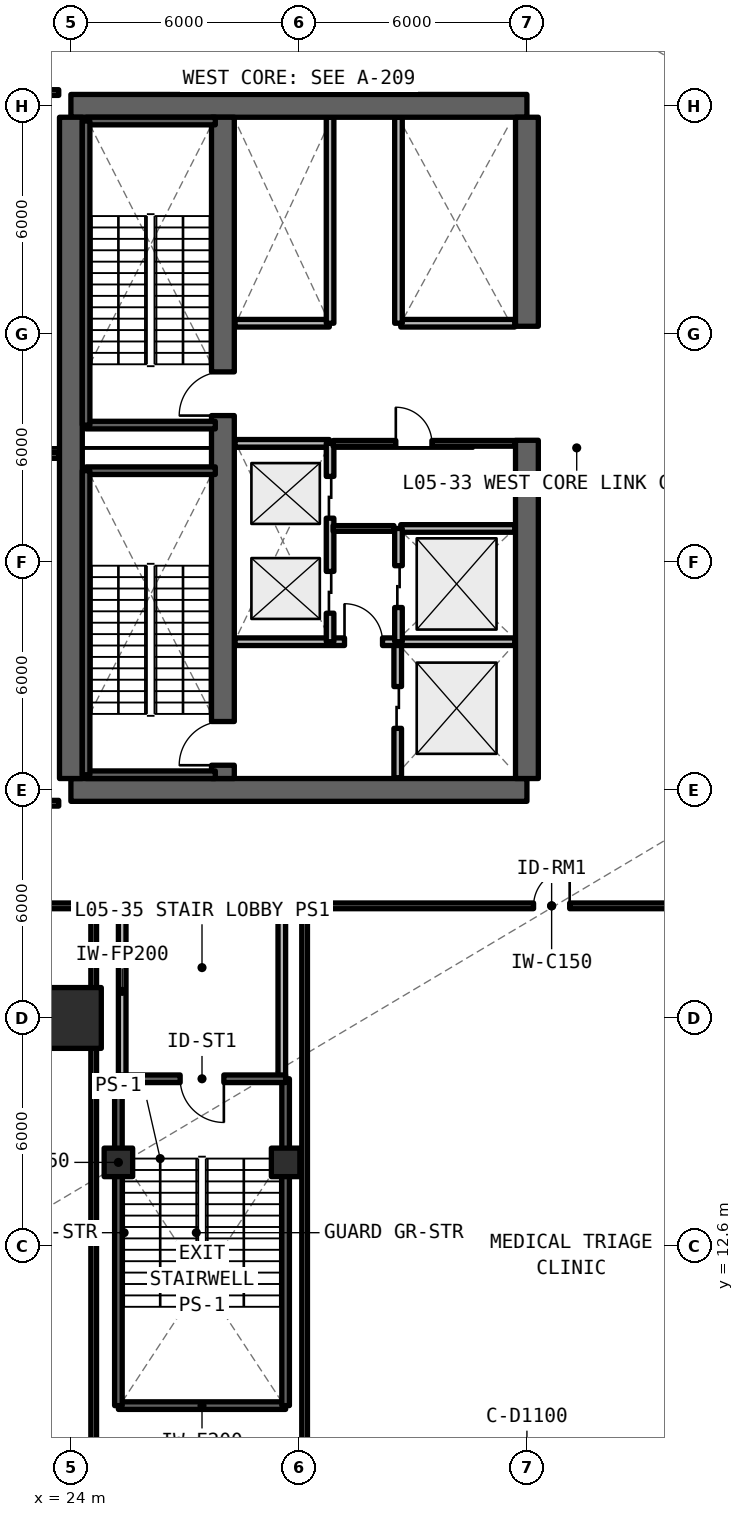
"""IFC4 building model, lengths in metres.
Left out: names, types, materials, properties, quantities, classifications, styles, units other than length and angle.
Written with IfcOpenShell. Run it as: python <this file> out.ifc"""

import sys

from ifc_helpers import new_model, si_unit, direction, frame, frame_2d, origin, origin_2d, place, context, subcontext, project, spatial, rectangle, extrude, element, fill, save


model = new_model("IFC4")
c1 = context("Model", 3, precision=1e-05, world=origin(), true_north=direction((0.0, 1.0)))
c2 = subcontext(c1, "Body", "Model", "MODEL_VIEW")
j1 = project(units=[si_unit("LENGTHUNIT", "METRE"), si_unit("PLANEANGLEUNIT", "RADIAN")], contexts=[c1])
p1 = place(None, origin())
s1 = spatial("IfcSite", under=j1, at=p1, CompositionType="ELEMENT")
p2 = place(p1, origin())
s2 = spatial("IfcBuilding", under=s1, at=p2, CompositionType="ELEMENT")
p3 = place(p2, frame((0.0, 0.0, 19.47)))
s3 = spatial("IfcBuildingStorey", under=s2, at=p3, CompositionType="ELEMENT", Elevation=19.47)
for number, where, z_axis, x_axis in (
    (1, (24.0, 24.6, 0.0), (0.0, 0.0, 1.0), (1.0, 0.0, 0.0)),
    (2, (36.0, 42.6, 0.0), (0.0, 0.0, 1.0), (-1.0, 0.0, 0.0)),
):
    element("IfcWall", number, at=place(p3, frame(where, z_axis=z_axis, x_axis=x_axis)), inside=s3, PredefinedType="SHEAR", context=c2, shape_type="SweptSolid", body=[
        extrude(rectangle(XDim=12.0, YDim=0.6, at=frame_2d((6.0, 0.0))), origin(), (0.0, 0.0, 1.0), 4.62),
    ])
p4 = place(p3, frame((24.0, 24.9, 0.0), z_axis=(0.0, 0.0, 1.0), x_axis=(0.0, 1.0, 0.0)))
e3 = element("IfcWall", 3, at=p4, inside=s3, PredefinedType="SHEAR", context=c2, shape_type="SweptSolid", body=[
    extrude(rectangle(XDim=17.4, YDim=0.6, at=frame_2d((8.7, 0.0))), origin(), (0.0, 0.0, 1.0), 4.62),
])
p5 = place(p3, frame((36.0, 24.9, 0.0), z_axis=(0.0, 0.0, 1.0), x_axis=(0.0, 1.0, 0.0)))
e4 = element("IfcWall", 4, at=p5, inside=s3, PredefinedType="SHEAR", context=c2, shape_type="SweptSolid", body=[
    extrude(rectangle(XDim=8.9, YDim=0.6, at=frame_2d((4.45, 0.0))), origin(), (0.0, 0.0, 1.0), 4.62),
])
p6 = place(p3, frame((36.0, 36.8, 0.0), z_axis=(0.0, 0.0, 1.0), x_axis=(0.0, 1.0, 0.0)))
e5 = element("IfcWall", 5, at=p6, inside=s3, PredefinedType="SHEAR", context=c2, shape_type="SweptSolid", body=[
    extrude(rectangle(XDim=5.5, YDim=0.6, at=frame_2d((2.75, 0.0))), origin(), (0.0, 0.0, 1.0), 4.62),
])
p7 = place(p3, frame((28.0, 24.9, 0.0), z_axis=(0.0, 0.0, 1.0), x_axis=(0.0, 1.0, 0.0)))
e6 = element("IfcWall", 6, at=p7, inside=s3, PredefinedType="SHEAR", context=c2, shape_type="SweptSolid", body=[
    extrude(rectangle(XDim=17.4, YDim=0.6, at=frame_2d((8.7, 0.0))), origin(), (0.0, 0.0, 1.0), 4.62),
])
p8 = place(p7, frame((0.35, 0.0, 0.0)))
e7 = element("IfcOpeningElement", 7, at=p8, cuts=e6, PredefinedType="OPENING", context=c2, shape_type="SweptSolid", body=[
    extrude(rectangle(XDim=1.15, YDim=2.15, at=frame_2d((0.575, 1.075))), frame((0.0, 0.31, 0.0), z_axis=(0.0, -1.0, 0.0), x_axis=(1.0, 0.0, 0.0)), (0.0, 0.0, 1.0), 0.62),
])
p9 = place(p7, frame((9.55, 0.0, 0.0)))
e8 = element("IfcOpeningElement", 8, at=p9, cuts=e6, PredefinedType="OPENING", context=c2, shape_type="SweptSolid", body=[
    extrude(rectangle(XDim=1.15, YDim=2.15, at=frame_2d((0.575, 1.075))), frame((0.0, 0.31, 0.0), z_axis=(0.0, -1.0, 0.0), x_axis=(1.0, 0.0, 0.0)), (0.0, 0.0, 1.0), 0.62),
])
p10 = place(p3, frame((24.0, 18.6, 0.0), z_axis=(0.0, 0.0, 1.0), x_axis=(1.0, 0.0, 0.0)))
e9 = element("IfcColumn", 9, at=p10, inside=s3, PredefinedType="COLUMN", context=c2, shape_type="SweptSolid", body=[
    extrude(rectangle(XDim=1.6, YDim=1.6, at=origin_2d()), origin(), (0.0, 0.0, 1.0), 4.62),
])
for number, where, z_axis, x_axis in (
    (10, (25.25, 14.8, 0.0), (0.0, 0.0, 1.0), (1.0, 0.0, 0.0)),
    (11, (29.65, 14.8, 0.0), (0.0, 0.0, 1.0), (1.0, 0.0, 0.0)),
):
    element("IfcColumn", number, at=place(p3, frame(where, z_axis=z_axis, x_axis=x_axis)), inside=s3, PredefinedType="COLUMN", context=c2, shape_type="SweptSolid", body=[
        extrude(rectangle(XDim=0.75, YDim=0.75, at=origin_2d()), origin(), (0.0, 0.0, 1.0), 4.27),
    ])
p11 = place(p3, frame((32.6, 24.92, 0.0), z_axis=(0.0, 0.0, 1.0), x_axis=(0.0, 1.0, 0.0)))
e12 = element("IfcWall", 12, at=p11, inside=s3, PredefinedType="SOLIDWALL", context=c2, shape_type="SweptSolid", body=[
    extrude(rectangle(XDim=3.58, YDim=0.2, at=frame_2d((1.79, 0.0))), origin(), (0.0, 0.0, 1.0), 3.49),
])
p12 = place(p11, frame((1.3, 0.0, 0.0)))
e13 = element("IfcOpeningElement", 13, at=p12, cuts=e12, PredefinedType="OPENING", context=c2, shape_type="SweptSolid", body=[
    extrude(rectangle(XDim=1.1, YDim=2.2, at=frame_2d((0.55, 1.1))), frame((0.0, 0.11, 0.0), z_axis=(0.0, -1.0, 0.0), x_axis=(1.0, 0.0, 0.0)), (0.0, 0.0, 1.0), 0.22),
])
p13 = place(p3, frame((28.32, 28.5, 0.0), z_axis=(0.0, 0.0, 1.0), x_axis=(1.0, 0.0, 0.0)))
e14 = element("IfcWall", 14, at=p13, inside=s3, PredefinedType="SOLIDWALL", context=c2, shape_type="SweptSolid", body=[
    extrude(rectangle(XDim=7.36, YDim=0.2, at=frame_2d((3.68, 0.0))), origin(), (0.0, 0.0, 1.0), 3.49),
])
p14 = place(p13, frame((2.88, 0.0, 0.0)))
e15 = element("IfcOpeningElement", 15, at=p14, cuts=e14, PredefinedType="OPENING", context=c2, shape_type="SweptSolid", body=[
    extrude(rectangle(XDim=1.0, YDim=2.15, at=frame_2d((0.5, 1.075))), frame((0.0, 0.11, 0.0), z_axis=(0.0, -1.0, 0.0), x_axis=(1.0, 0.0, 0.0)), (0.0, 0.0, 1.0), 0.22),
])
p15 = place(p3, frame((28.32, 33.72, 0.0), z_axis=(0.0, 0.0, 1.0), x_axis=(1.0, 0.0, 0.0)))
e16 = element("IfcWall", 16, at=p15, inside=s3, PredefinedType="SOLIDWALL", context=c2, shape_type="SweptSolid", body=[
    extrude(rectangle(XDim=2.48, YDim=0.2, at=frame_2d((1.24, 0.0))), origin(), (0.0, 0.0, 1.0), 3.49),
])
p16 = place(p3, frame((30.82, 28.5, 0.0), z_axis=(0.0, 0.0, 1.0), x_axis=(0.0, 1.0, 0.0)))
e17 = element("IfcWall", 17, at=p16, inside=s3, PredefinedType="SOLIDWALL", context=c2, shape_type="SweptSolid", body=[
    extrude(rectangle(XDim=5.22, YDim=0.2, at=frame_2d((2.61, 0.0))), origin(), (0.0, 0.0, 1.0), 3.49),
])
p17 = place(p16, frame((0.75, 0.0, 0.0)))
e18 = element("IfcOpeningElement", 18, at=p17, cuts=e17, PredefinedType="OPENING", context=c2, shape_type="SweptSolid", body=[
    extrude(rectangle(XDim=1.1, YDim=2.2, at=frame_2d((0.55, 1.1))), frame((0.0, 0.11, 0.0), z_axis=(0.0, -1.0, 0.0), x_axis=(1.0, 0.0, 0.0)), (0.0, 0.0, 1.0), 0.22),
])
p18 = place(p16, frame((3.25, 0.0, 0.0)))
e19 = element("IfcOpeningElement", 19, at=p18, cuts=e17, PredefinedType="OPENING", context=c2, shape_type="SweptSolid", body=[
    extrude(rectangle(XDim=1.1, YDim=2.2, at=frame_2d((0.55, 1.1))), frame((0.0, 0.11, 0.0), z_axis=(0.0, -1.0, 0.0), x_axis=(1.0, 0.0, 0.0)), (0.0, 0.0, 1.0), 0.22),
])
p19 = place(p3, frame((32.68, 31.48, 0.0), z_axis=(0.0, 0.0, 1.0), x_axis=(1.0, 0.0, 0.0)))
e20 = element("IfcWall", 20, at=p19, inside=s3, PredefinedType="SOLIDWALL", context=c2, shape_type="SweptSolid", body=[
    extrude(rectangle(XDim=3.0, YDim=0.2, at=frame_2d((1.5, 0.0))), origin(), (0.0, 0.0, 1.0), 3.49),
])
p20 = place(p3, frame((32.62, 28.5, 0.0), z_axis=(0.0, 0.0, 1.0), x_axis=(0.0, 1.0, 0.0)))
e21 = element("IfcWall", 21, at=p20, inside=s3, PredefinedType="SOLIDWALL", context=c2, shape_type="SweptSolid", body=[
    extrude(rectangle(XDim=2.98, YDim=0.2, at=frame_2d((1.49, 0.0))), origin(), (0.0, 0.0, 1.0), 3.49),
])
p21 = place(p20, frame((0.9, 0.0, 0.0)))
e22 = element("IfcOpeningElement", 22, at=p21, cuts=e21, PredefinedType="OPENING", context=c2, shape_type="SweptSolid", body=[
    extrude(rectangle(XDim=1.1, YDim=2.2, at=frame_2d((0.55, 1.1))), frame((0.0, 0.11, 0.0), z_axis=(0.0, -1.0, 0.0), x_axis=(1.0, 0.0, 0.0)), (0.0, 0.0, 1.0), 0.22),
])
p22 = place(p3, frame((30.9, 31.48, 0.0), z_axis=(0.0, 0.0, 1.0), x_axis=(1.0, 0.0, 0.0)))
e23 = element("IfcWall", 23, at=p22, inside=s3, PredefinedType="SOLIDWALL", context=c2, shape_type="SweptSolid", body=[
    extrude(rectangle(XDim=1.6, YDim=0.15, at=frame_2d((0.8, 0.0))), origin(), (0.0, 0.0, 1.0), 3.49),
])
p23 = place(p3, frame((30.9, 33.72, 0.0), z_axis=(0.0, 0.0, 1.0), x_axis=(1.0, 0.0, 0.0)))
e24 = element("IfcWall", 24, at=p23, inside=s3, PredefinedType="SOLIDWALL", context=c2, shape_type="SweptSolid", body=[
    extrude(rectangle(XDim=4.78, YDim=0.15, at=frame_2d((2.39, 0.0))), origin(), (0.0, 0.0, 1.0), 3.49),
])
p24 = place(p23, frame((1.65, 0.0, 0.0)))
e25 = element("IfcOpeningElement", 25, at=p24, cuts=e24, PredefinedType="OPENING", context=c2, shape_type="SweptSolid", body=[
    extrude(rectangle(XDim=0.95, YDim=2.15, at=frame_2d((0.475, 1.075))), frame((0.0, 0.085, 0.0), z_axis=(0.0, -1.0, 0.0), x_axis=(1.0, 0.0, 0.0)), (0.0, 0.0, 1.0), 0.17),
])
p25 = place(p3, frame((28.32, 36.88, 0.0), z_axis=(0.0, 0.0, 1.0), x_axis=(1.0, 0.0, 0.0)))
e26 = element("IfcWall", 26, at=p25, inside=s3, PredefinedType="SOLIDWALL", context=c2, shape_type="SweptSolid", body=[
    extrude(rectangle(XDim=2.48, YDim=0.2, at=frame_2d((1.24, 0.0))), origin(), (0.0, 0.0, 1.0), 3.49),
])
p26 = place(p3, frame((30.82, 36.88, 0.0), z_axis=(0.0, 0.0, 1.0), x_axis=(0.0, 1.0, 0.0)))
e27 = element("IfcWall", 27, at=p26, inside=s3, PredefinedType="SOLIDWALL", context=c2, shape_type="SweptSolid", body=[
    extrude(rectangle(XDim=5.42, YDim=0.2, at=frame_2d((2.71, 0.0))), origin(), (0.0, 0.0, 1.0), 3.49),
])
p27 = place(p3, frame((32.68, 36.88, 0.0), z_axis=(0.0, 0.0, 1.0), x_axis=(1.0, 0.0, 0.0)))
e28 = element("IfcWall", 28, at=p27, inside=s3, PredefinedType="SOLIDWALL", context=c2, shape_type="SweptSolid", body=[
    extrude(rectangle(XDim=3.0, YDim=0.2, at=frame_2d((1.5, 0.0))), origin(), (0.0, 0.0, 1.0), 3.49),
])
p28 = place(p3, frame((32.62, 36.88, 0.0), z_axis=(0.0, 0.0, 1.0), x_axis=(0.0, 1.0, 0.0)))
e29 = element("IfcWall", 29, at=p28, inside=s3, PredefinedType="SOLIDWALL", context=c2, shape_type="SweptSolid", body=[
    extrude(rectangle(XDim=5.42, YDim=0.2, at=frame_2d((2.71, 0.0))), origin(), (0.0, 0.0, 1.0), 3.49),
])
for number, where, z_axis, x_axis in (
    (30, (25.35, 17.0, 0.0), (0.0, 0.0, 1.0), (0.0, 1.0, 0.0)),
    (31, (29.55, 17.0, 0.0), (0.0, 0.0, 1.0), (0.0, 1.0, 0.0)),
):
    element("IfcWall", number, at=place(p3, frame(where, z_axis=z_axis, x_axis=x_axis)), inside=s3, PredefinedType="SOLIDWALL", context=c2, shape_type="SweptSolid", body=[
        extrude(rectangle(XDim=4.6, YDim=0.2, at=frame_2d((2.3, 0.0))), origin(), (0.0, 0.0, 1.0), 3.49),
    ])
p29 = place(p3, frame((30.15, 21.55, 0.0), z_axis=(0.0, 0.0, 1.0), x_axis=(1.0, 0.0, 0.0)))
e32 = element("IfcWall", 32, at=p29, inside=s3, PredefinedType="SOLIDWALL", context=c2, shape_type="SweptSolid", body=[
    extrude(rectangle(XDim=13.0, YDim=0.15, at=frame_2d((6.5, 0.0))), origin(), (0.0, 0.0, 1.0), 3.49),
])
p30 = place(p29, frame((6.025, 0.0, 0.0)))
e33 = element("IfcOpeningElement", 33, at=p30, cuts=e32, PredefinedType="OPENING", context=c2, shape_type="SweptSolid", body=[
    extrude(rectangle(XDim=0.95, YDim=2.15, at=frame_2d((0.475, 1.075))), frame((0.0, 0.085, 0.0), z_axis=(0.0, -1.0, 0.0), x_axis=(1.0, 0.0, 0.0)), (0.0, 0.0, 1.0), 0.17),
])
p31 = place(p3, frame((30.15, 4.28, 0.0), z_axis=(0.0, 0.0, 1.0), x_axis=(0.0, 1.0, 0.0)))
e34 = element("IfcWall", 34, at=p31, inside=s3, PredefinedType="SOLIDWALL", context=c2, shape_type="SweptSolid", body=[
    extrude(rectangle(XDim=17.27, YDim=0.15, at=frame_2d((8.635, 0.0))), origin(), (0.0, 0.0, 1.0), 3.49),
])
p32 = place(p3, frame((10.2, 24.25, 0.0), z_axis=(0.0, 0.0, 1.0), x_axis=(1.0, 0.0, 0.0)))
e35 = element("IfcWall", 35, at=p32, inside=s3, PredefinedType="SOLIDWALL", context=c2, shape_type="SweptSolid", body=[
    extrude(rectangle(XDim=13.48, YDim=0.15, at=frame_2d((6.74, 0.0))), origin(), (0.0, 0.0, 1.0), 3.49),
])
p33 = place(p32, frame((6.265, 0.0, 0.0)))
e36 = element("IfcOpeningElement", 36, at=p33, cuts=e35, PredefinedType="OPENING", context=c2, shape_type="SweptSolid", body=[
    extrude(rectangle(XDim=0.95, YDim=2.15, at=frame_2d((0.475, 1.075))), frame((0.0, 0.085, 0.0), z_axis=(0.0, -1.0, 0.0), x_axis=(1.0, 0.0, 0.0)), (0.0, 0.0, 1.0), 0.17),
])
p34 = place(p3, frame((10.2, 33.4, 0.0), z_axis=(0.0, 0.0, 1.0), x_axis=(1.0, 0.0, 0.0)))
e37 = element("IfcWall", 37, at=p34, inside=s3, PredefinedType="SOLIDWALL", context=c2, shape_type="SweptSolid", body=[
    extrude(rectangle(XDim=13.48, YDim=0.15, at=frame_2d((6.74, 0.0))), origin(), (0.0, 0.0, 1.0), 3.49),
])
p35 = place(p3, frame((10.2, 42.95, 0.0), z_axis=(0.0, 0.0, 1.0), x_axis=(1.0, 0.0, 0.0)))
e38 = element("IfcWall", 38, at=p35, inside=s3, PredefinedType="SOLIDWALL", context=c2, shape_type="SweptSolid", body=[
    extrude(rectangle(XDim=13.48, YDim=0.15, at=frame_2d((6.74, 0.0))), origin(), (0.0, 0.0, 1.0), 3.49),
])
p36 = place(p35, frame((6.265, 0.0, 0.0)))
e39 = element("IfcOpeningElement", 39, at=p36, cuts=e38, PredefinedType="OPENING", context=c2, shape_type="SweptSolid", body=[
    extrude(rectangle(XDim=0.95, YDim=2.15, at=frame_2d((0.475, 1.075))), frame((0.0, 0.085, 0.0), z_axis=(0.0, -1.0, 0.0), x_axis=(1.0, 0.0, 0.0)), (0.0, 0.0, 1.0), 0.17),
])
p37 = place(p3, frame((10.2, 21.55, 0.0), z_axis=(0.0, 0.0, 1.0), x_axis=(1.0, 0.0, 0.0)))
e40 = element("IfcWall", 40, at=p37, inside=s3, PredefinedType="SOLIDWALL", context=c2, shape_type="SweptSolid", body=[
    extrude(rectangle(XDim=14.4, YDim=0.15, at=frame_2d((7.2, 0.0))), origin(), (0.0, 0.0, 1.0), 3.49),
])
p38 = place(p37, frame((6.65, 0.0, 0.0)))
e41 = element("IfcOpeningElement", 41, at=p38, cuts=e40, PredefinedType="OPENING", context=c2, shape_type="SweptSolid", body=[
    extrude(rectangle(XDim=1.1, YDim=2.15, at=frame_2d((0.55, 1.075))), frame((0.0, 0.085, 0.0), z_axis=(0.0, -1.0, 0.0), x_axis=(1.0, 0.0, 0.0)), (0.0, 0.0, 1.0), 0.17),
])
p39 = place(p3, frame((24.6, 4.28, 0.0), z_axis=(0.0, 0.0, 1.0), x_axis=(0.0, 1.0, 0.0)))
e42 = element("IfcWall", 42, at=p39, inside=s3, PredefinedType="SOLIDWALL", context=c2, shape_type="SweptSolid", body=[
    extrude(rectangle(XDim=17.27, YDim=0.15, at=frame_2d((8.635, 0.0))), origin(), (0.0, 0.0, 1.0), 3.49),
])
for number, where, z_axis, x_axis in (
    (43, (24.4, 25.0, 0.0), (0.0, 0.0, 1.0), (1.0, 0.0, 0.0)),
    (44, (27.8, 33.0, 0.0), (0.0, 0.0, 1.0), (-1.0, 0.0, 0.0)),
):
    element("IfcWall", number, at=place(p3, frame(where, z_axis=z_axis, x_axis=x_axis)), inside=s3, PredefinedType="SOLIDWALL", context=c2, shape_type="SweptSolid", body=[
        extrude(rectangle(XDim=3.4, YDim=0.2, at=frame_2d((1.7, 0.0))), origin(), (0.0, 0.0, 1.0), 4.62),
    ])
p40 = place(p3, frame((24.4, 33.0, 0.0), z_axis=(0.0, 0.0, 1.0), x_axis=(0.0, -1.0, 0.0)))
e45 = element("IfcWall", 45, at=p40, inside=s3, PredefinedType="SOLIDWALL", context=c2, shape_type="SweptSolid", body=[
    extrude(rectangle(XDim=8.0, YDim=0.2, at=frame_2d((4.0, 0.0))), origin(), (0.0, 0.0, 1.0), 4.62),
])
for number, where, z_axis, x_axis in (
    (46, (24.4, 34.2, 0.0), (0.0, 0.0, 1.0), (1.0, 0.0, 0.0)),
    (47, (27.8, 42.2, 0.0), (0.0, 0.0, 1.0), (-1.0, 0.0, 0.0)),
):
    element("IfcWall", number, at=place(p3, frame(where, z_axis=z_axis, x_axis=x_axis)), inside=s3, PredefinedType="SOLIDWALL", context=c2, shape_type="SweptSolid", body=[
        extrude(rectangle(XDim=3.4, YDim=0.2, at=frame_2d((1.7, 0.0))), origin(), (0.0, 0.0, 1.0), 4.62),
    ])
p41 = place(p3, frame((24.4, 42.2, 0.0), z_axis=(0.0, 0.0, 1.0), x_axis=(0.0, -1.0, 0.0)))
e48 = element("IfcWall", 48, at=p41, inside=s3, PredefinedType="SOLIDWALL", context=c2, shape_type="SweptSolid", body=[
    extrude(rectangle(XDim=8.0, YDim=0.2, at=frame_2d((4.0, 0.0))), origin(), (0.0, 0.0, 1.0), 4.62),
])
p42 = place(p3, frame((25.25, 8.4, 0.0), z_axis=(0.0, 0.0, 1.0), x_axis=(1.0, 0.0, 0.0)))
e49 = element("IfcWall", 49, at=p42, inside=s3, PredefinedType="SOLIDWALL", context=c2, shape_type="SweptSolid", body=[
    extrude(rectangle(XDim=4.4, YDim=0.2, at=frame_2d((2.2, 0.0))), origin(), (0.0, 0.0, 1.0), 4.62),
])
p43 = place(p3, frame((29.65, 8.4, 0.0), z_axis=(0.0, 0.0, 1.0), x_axis=(0.0, 1.0, 0.0)))
e50 = element("IfcWall", 50, at=p43, inside=s3, PredefinedType="SOLIDWALL", context=c2, shape_type="SweptSolid", body=[
    extrude(rectangle(XDim=8.6, YDim=0.2, at=frame_2d((4.3, 0.0))), origin(), (0.0, 0.0, 1.0), 4.62),
])
p44 = place(p3, frame((29.65, 17.0, 0.0), z_axis=(0.0, 0.0, 1.0), x_axis=(-1.0, 0.0, 0.0)))
e51 = element("IfcWall", 51, at=p44, inside=s3, PredefinedType="SOLIDWALL", context=c2, shape_type="SweptSolid", body=[
    extrude(rectangle(XDim=4.4, YDim=0.2, at=frame_2d((2.2, 0.0))), origin(), (0.0, 0.0, 1.0), 4.62),
])
p45 = place(p44, frame((1.625, 0.0, 0.0)))
e52 = element("IfcOpeningElement", 52, at=p45, cuts=e51, PredefinedType="OPENING", context=c2, shape_type="SweptSolid", body=[
    extrude(rectangle(XDim=1.15, YDim=2.15, at=frame_2d((0.575, 1.075))), frame((0.0, 0.11, 0.0), z_axis=(0.0, -1.0, 0.0), x_axis=(1.0, 0.0, 0.0)), (0.0, 0.0, 1.0), 0.22),
])
p46 = place(p3, frame((25.25, 17.0, 0.0), z_axis=(0.0, 0.0, 1.0), x_axis=(0.0, -1.0, 0.0)))
e53 = element("IfcWall", 53, at=p46, inside=s3, PredefinedType="SOLIDWALL", context=c2, shape_type="SweptSolid", body=[
    extrude(rectangle(XDim=8.6, YDim=0.2, at=frame_2d((4.3, 0.0))), origin(), (0.0, 0.0, 1.0), 4.62),
])
p47 = place(p12, origin())
e54 = element("IfcDoor", 54, at=p47, inside=s3, OperationType="SLIDING_TO_LEFT", PredefinedType="DOOR", context=c2, shape_type="SweptSolid", body=[
    extrude(rectangle(XDim=1.1, YDim=2.2, at=frame_2d((0.55, 1.1))), frame((0.0, 0.025, 0.0), z_axis=(0.0, -1.0, 0.0), x_axis=(1.0, 0.0, 0.0)), (0.0, 0.0, 1.0), 0.05),
])
fill(e13, e54)
p48 = place(p14, origin())
e55 = element("IfcDoor", 55, at=p48, inside=s3, OperationType="SINGLE_SWING_LEFT", PredefinedType="DOOR", context=c2, shape_type="SweptSolid", body=[
    extrude(rectangle(XDim=1.0, YDim=2.15, at=frame_2d((0.5, 1.075))), frame((0.0, 0.025, 0.0), z_axis=(0.0, -1.0, 0.0), x_axis=(1.0, 0.0, 0.0)), (0.0, 0.0, 1.0), 0.05),
])
fill(e15, e55)
p49 = place(p17, origin())
e56 = element("IfcDoor", 56, at=p49, inside=s3, OperationType="SLIDING_TO_LEFT", PredefinedType="DOOR", context=c2, shape_type="SweptSolid", body=[
    extrude(rectangle(XDim=1.1, YDim=2.2, at=frame_2d((0.55, 1.1))), frame((0.0, 0.025, 0.0), z_axis=(0.0, -1.0, 0.0), x_axis=(1.0, 0.0, 0.0)), (0.0, 0.0, 1.0), 0.05),
])
fill(e18, e56)
p50 = place(p18, origin())
e57 = element("IfcDoor", 57, at=p50, inside=s3, OperationType="SLIDING_TO_RIGHT", PredefinedType="DOOR", context=c2, shape_type="SweptSolid", body=[
    extrude(rectangle(XDim=1.1, YDim=2.2, at=frame_2d((0.55, 1.1))), frame((0.0, 0.025, 0.0), z_axis=(0.0, -1.0, 0.0), x_axis=(1.0, 0.0, 0.0)), (0.0, 0.0, 1.0), 0.05),
])
fill(e19, e57)
p51 = place(p21, origin())
e58 = element("IfcDoor", 58, at=p51, inside=s3, OperationType="SLIDING_TO_LEFT", PredefinedType="DOOR", context=c2, shape_type="SweptSolid", body=[
    extrude(rectangle(XDim=1.1, YDim=2.2, at=frame_2d((0.55, 1.1))), frame((0.0, 0.025, 0.0), z_axis=(0.0, -1.0, 0.0), x_axis=(1.0, 0.0, 0.0)), (0.0, 0.0, 1.0), 0.05),
])
fill(e22, e58)
p52 = place(p24, origin())
e59 = element("IfcDoor", 59, at=p52, inside=s3, OperationType="SINGLE_SWING_LEFT", PredefinedType="DOOR", context=c2, shape_type="SweptSolid", body=[
    extrude(rectangle(XDim=0.95, YDim=2.15, at=frame_2d((0.475, 1.075))), frame((0.0, 0.025, 0.0), z_axis=(0.0, -1.0, 0.0), x_axis=(1.0, 0.0, 0.0)), (0.0, 0.0, 1.0), 0.05),
])
fill(e25, e59)
p53 = place(p30, origin())
e60 = element("IfcDoor", 60, at=p53, inside=s3, OperationType="SINGLE_SWING_RIGHT", PredefinedType="DOOR", context=c2, shape_type="SweptSolid", body=[
    extrude(rectangle(XDim=0.95, YDim=2.15, at=frame_2d((0.475, 1.075))), frame((0.0, 0.025, 0.0), z_axis=(0.0, -1.0, 0.0), x_axis=(1.0, 0.0, 0.0)), (0.0, 0.0, 1.0), 0.05),
])
fill(e33, e60)
p54 = place(p8, origin())
e61 = element("IfcDoor", 61, at=p54, inside=s3, OperationType="SINGLE_SWING_RIGHT", PredefinedType="DOOR", context=c2, shape_type="SweptSolid", body=[
    extrude(rectangle(XDim=1.15, YDim=2.15, at=frame_2d((0.575, 1.075))), frame((0.0, 0.025, 0.0), z_axis=(0.0, -1.0, 0.0), x_axis=(1.0, 0.0, 0.0)), (0.0, 0.0, 1.0), 0.05),
])
fill(e7, e61)
p55 = place(p9, origin())
e62 = element("IfcDoor", 62, at=p55, inside=s3, OperationType="SINGLE_SWING_LEFT", PredefinedType="DOOR", context=c2, shape_type="SweptSolid", body=[
    extrude(rectangle(XDim=1.15, YDim=2.15, at=frame_2d((0.575, 1.075))), frame((0.0, 0.025, 0.0), z_axis=(0.0, -1.0, 0.0), x_axis=(1.0, 0.0, 0.0)), (0.0, 0.0, 1.0), 0.05),
])
fill(e8, e62)
p56 = place(p45, origin())
e63 = element("IfcDoor", 63, at=p56, inside=s3, OperationType="SINGLE_SWING_RIGHT", PredefinedType="DOOR", context=c2, shape_type="SweptSolid", body=[
    extrude(rectangle(XDim=1.15, YDim=2.15, at=frame_2d((0.575, 1.075))), frame((0.0, 0.025, 0.0), z_axis=(0.0, -1.0, 0.0), x_axis=(1.0, 0.0, 0.0)), (0.0, 0.0, 1.0), 0.05),
])
fill(e52, e63)
save(model, sys.argv[1])
